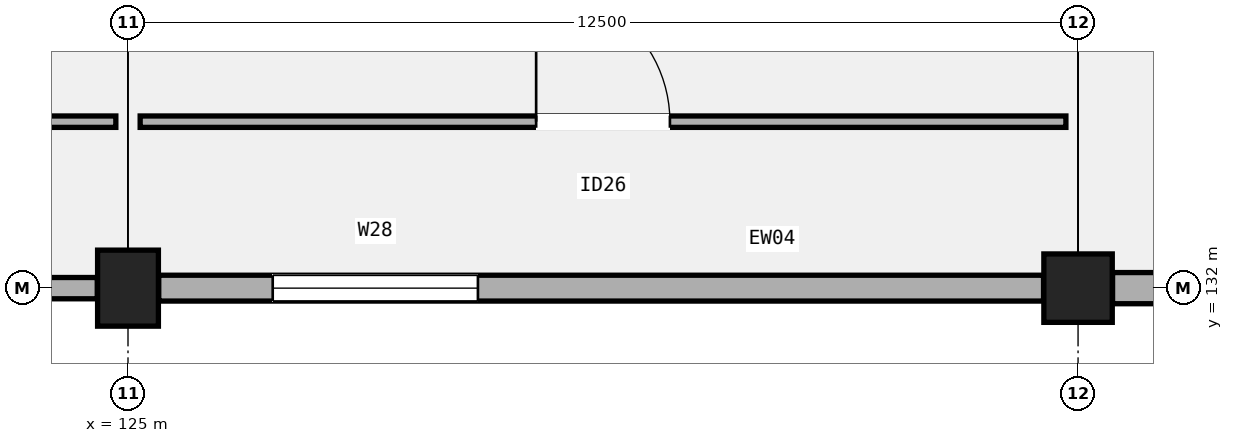
"""IFC4 building model, lengths in metres.
Left out: names, types, materials, properties, quantities, classifications, styles, units other than length and angle.
Written with IfcOpenShell. Run it as: python <this file> out.ifc"""

import sys

from ifc_helpers import new_model, si_unit, direction, frame, frame_2d, origin, origin_2d, place, context, subcontext, project, spatial, rectangle, extrude, element, fill, save


model = new_model("IFC4")
c1 = context("Model", 3, precision=1e-05, world=origin(), true_north=direction((0.0, 1.0)))
c2 = subcontext(c1, "Body", "Model", "MODEL_VIEW")
j1 = project(units=[si_unit("LENGTHUNIT", "METRE"), si_unit("PLANEANGLEUNIT", "RADIAN")], contexts=[c1])
p1 = place(None, origin())
s1 = spatial("IfcSite", under=j1, at=p1, CompositionType="ELEMENT")
p2 = place(p1, origin())
s2 = spatial("IfcBuilding", under=s1, at=p2, CompositionType="ELEMENT")
p3 = place(p2, frame((0.0, 0.0, 10.2)))
s3 = spatial("IfcBuildingStorey", under=s2, at=p3, CompositionType="ELEMENT", Elevation=10.2)
p4 = place(p3, frame((125.0, 132.0, 0.0), z_axis=(0.0, 0.0, 1.0), x_axis=(1.0, 0.0, 0.0)))
e1 = element("IfcColumn", 1, at=p4, inside=s3, PredefinedType="COLUMN", context=c2, shape_type="SweptSolid", body=[
    extrude(rectangle(XDim=0.8, YDim=1.0, at=origin_2d()), origin(), (0.0, 0.0, 1.0), 5.1),
])
p5 = place(p3, frame((137.5, 132.0, 0.0), z_axis=(0.0, 0.0, 1.0), x_axis=(1.0, 0.0, 0.0)))
e2 = element("IfcColumn", 2, at=p5, inside=s3, PredefinedType="COLUMN", context=c2, shape_type="SweptSolid", body=[
    extrude(rectangle(XDim=0.9, YDim=0.9, at=origin_2d()), origin(), (0.0, 0.0, 1.0), 5.1),
])
p6 = place(p3, frame((112.404, 132.0, 0.0), z_axis=(0.0, 0.0, 1.0), x_axis=(1.0, 0.0, 0.0)))
e3 = element("IfcWall", 3, at=p6, inside=s3, PredefinedType="SOLIDWALL", context=c2, shape_type="SweptSolid", body=[
    extrude(rectangle(XDim=12.192, YDim=0.28, at=frame_2d((6.096, 0.0))), origin(), (0.0, 0.0, 1.0), 4.22),
])
p7 = place(p6, frame((1.5, 0.0, 0.95)))
e4 = element("IfcOpeningElement", 4, at=p7, cuts=e3, PredefinedType="OPENING", context=c2, shape_type="SweptSolid", body=[
    extrude(rectangle(XDim=2.4, YDim=2.45, at=frame_2d((1.2, 1.225))), frame((0.0, 0.15, 0.0), z_axis=(0.0, -1.0, 0.0), x_axis=(1.0, 0.0, 0.0)), (0.0, 0.0, 1.0), 0.3),
])
p8 = place(p3, frame((125.404, 132.0, 0.0), z_axis=(0.0, 0.0, 1.0), x_axis=(1.0, 0.0, 0.0)))
e5 = element("IfcWall", 5, at=p8, inside=s3, PredefinedType="SOLIDWALL", context=c2, shape_type="SweptSolid", body=[
    extrude(rectangle(XDim=11.642, YDim=0.34, at=frame_2d((5.821, 0.0))), origin(), (0.0, 0.0, 1.0), 4.02),
])
p9 = place(p8, frame((1.5, 0.0, 0.95)))
e6 = element("IfcOpeningElement", 6, at=p9, cuts=e5, PredefinedType="OPENING", context=c2, shape_type="SweptSolid", body=[
    extrude(rectangle(XDim=2.7, YDim=2.2, at=frame_2d((1.35, 1.1))), frame((0.0, 0.18, 0.0), z_axis=(0.0, -1.0, 0.0), x_axis=(1.0, 0.0, 0.0)), (0.0, 0.0, 1.0), 0.36),
])
p10 = place(p3, frame((137.954, 132.0, 0.0), z_axis=(0.0, 0.0, 1.0), x_axis=(1.0, 0.0, 0.0)))
e7 = element("IfcWall", 7, at=p10, inside=s3, PredefinedType="SOLIDWALL", context=c2, shape_type="SweptSolid", body=[
    extrude(rectangle(XDim=11.642, YDim=0.41, at=frame_2d((5.821, 0.0))), origin(), (0.0, 0.0, 1.0), 4.12),
])
p11 = place(p10, frame((1.5, 0.0, 0.95)))
e8 = element("IfcOpeningElement", 8, at=p11, cuts=e7, PredefinedType="OPENING", context=c2, shape_type="SweptSolid", body=[
    extrude(rectangle(XDim=3.0, YDim=1.7, at=frame_2d((1.5, 0.85))), frame((0.0, 0.215, 0.0), z_axis=(0.0, -1.0, 0.0), x_axis=(1.0, 0.0, 0.0)), (0.0, 0.0, 1.0), 0.43),
])
p12 = place(p3, frame((112.16, 134.19, 0.0), z_axis=(0.0, 0.0, 1.0), x_axis=(1.0, 0.0, 0.0)))
e9 = element("IfcWall", 9, at=p12, inside=s3, PredefinedType="PARTITIONING", context=c2, shape_type="SweptSolid", body=[
    extrude(rectangle(XDim=12.68, YDim=0.15, at=frame_2d((6.34, 0.0))), origin(), (0.0, 0.0, 1.0), 4.22),
])
p13 = place(p12, frame((5.54, 0.0, 0.0)))
e10 = element("IfcOpeningElement", 10, at=p13, cuts=e9, PredefinedType="OPENING", context=c2, shape_type="SweptSolid", body=[
    extrude(rectangle(XDim=1.6, YDim=2.3, at=frame_2d((0.8, 1.15))), frame((0.0, 0.085, 0.0), z_axis=(0.0, -1.0, 0.0), x_axis=(1.0, 0.0, 0.0)), (0.0, 0.0, 1.0), 0.17),
])
p14 = place(p3, frame((125.16, 134.19, 0.0), z_axis=(0.0, 0.0, 1.0), x_axis=(1.0, 0.0, 0.0)))
e11 = element("IfcWall", 11, at=p14, inside=s3, PredefinedType="PARTITIONING", context=c2, shape_type="SweptSolid", body=[
    extrude(rectangle(XDim=12.18, YDim=0.15, at=frame_2d((6.09, 0.0))), origin(), (0.0, 0.0, 1.0), 4.22),
])
p15 = place(p14, frame((5.21, 0.0, 0.0)))
e12 = element("IfcOpeningElement", 12, at=p15, cuts=e11, PredefinedType="OPENING", context=c2, shape_type="SweptSolid", body=[
    extrude(rectangle(XDim=1.76, YDim=2.3, at=frame_2d((0.88, 1.15))), frame((0.0, 0.085, 0.0), z_axis=(0.0, -1.0, 0.0), x_axis=(1.0, 0.0, 0.0)), (0.0, 0.0, 1.0), 0.17),
])
p16 = place(p9, origin())
e13 = element("IfcWindow", 13, at=p16, inside=s3, PartitioningType="SINGLE_PANEL", PredefinedType="WINDOW", context=c2, shape_type="SweptSolid", body=[
    extrude(rectangle(XDim=2.7, YDim=2.2, at=frame_2d((1.35, 1.1))), frame((0.0, 0.03, 0.0), z_axis=(0.0, -1.0, 0.0), x_axis=(1.0, 0.0, 0.0)), (0.0, 0.0, 1.0), 0.06),
])
fill(e6, e13)
p17 = place(p15, origin())
e14 = element("IfcDoor", 14, at=p17, inside=s3, OperationType="SINGLE_SWING_LEFT", PredefinedType="DOOR", context=c2, shape_type="SweptSolid", body=[
    extrude(rectangle(XDim=1.76, YDim=2.3, at=frame_2d((0.88, 1.15))), frame((0.0, 0.025, 0.0), z_axis=(0.0, -1.0, 0.0), x_axis=(1.0, 0.0, 0.0)), (0.0, 0.0, 1.0), 0.05),
])
fill(e12, e14)
save(model, sys.argv[1])
